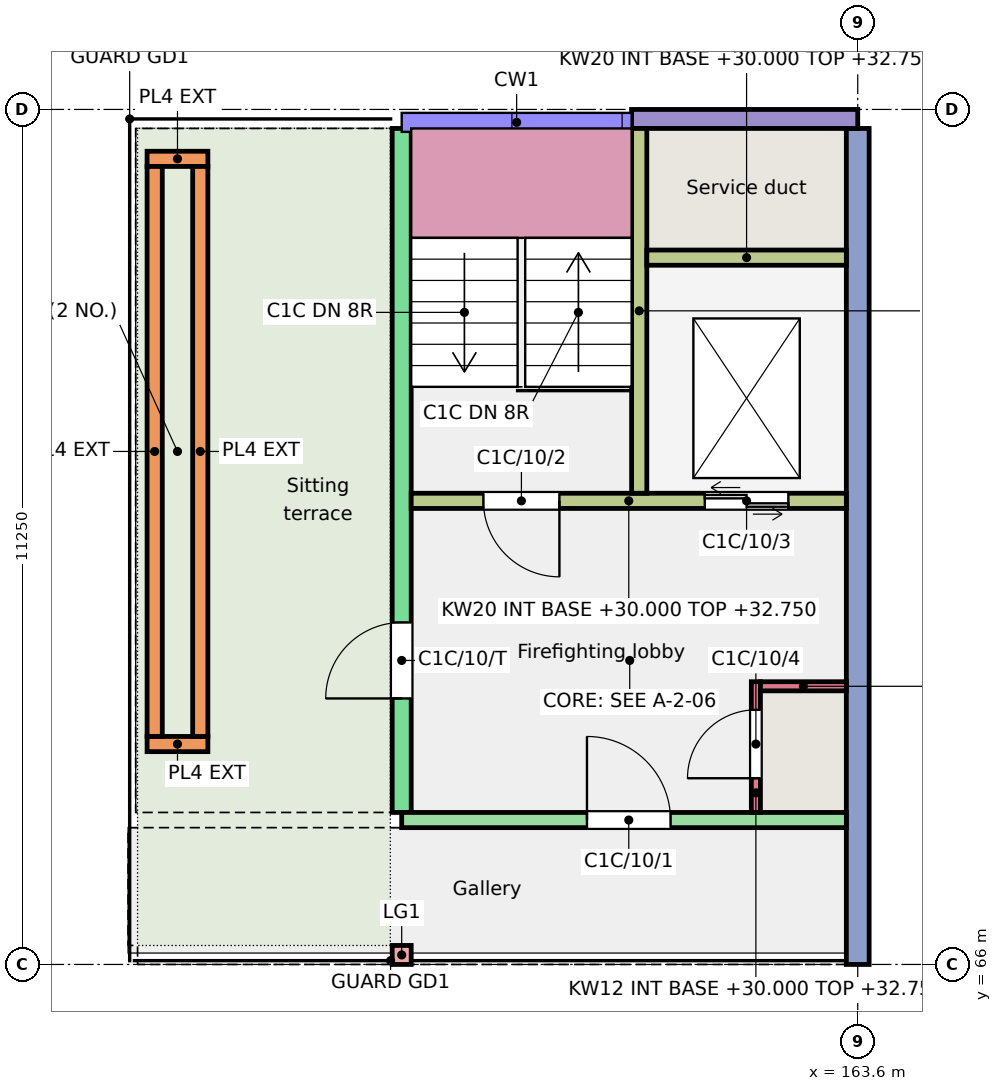
"""IFC4 building model, lengths in metres.
Left out: names, types, materials, properties, quantities, classifications, styles, units other than length and angle.
Written with IfcOpenShell. Run it as: python <this file> out.ifc"""

import sys

from ifc_helpers import new_model, si_unit, direction, frame, frame_2d, origin, origin_2d, place, context, subcontext, project, spatial, rectangle, extrude, element, fill, save


model = new_model("IFC4")
c1 = context("Model", 3, precision=1e-05, world=origin(), true_north=direction((0.0, 1.0)))
c2 = subcontext(c1, "Body", "Model", "MODEL_VIEW")
j1 = project(units=[si_unit("LENGTHUNIT", "METRE"), si_unit("PLANEANGLEUNIT", "RADIAN")], contexts=[c1])
p1 = place(None, origin())
s1 = spatial("IfcSite", under=j1, at=p1, CompositionType="ELEMENT")
p2 = place(p1, origin())
s2 = spatial("IfcBuilding", under=s1, at=p2, CompositionType="ELEMENT")
p3 = place(p2, frame((0.0, 0.0, 30.0)))
s3 = spatial("IfcBuildingStorey", under=s2, at=p3, CompositionType="ELEMENT", Elevation=30.0)
p4 = place(p3, frame((157.6, 68.0, 0.0), z_axis=(0.0, 0.0, 1.0), x_axis=(0.0, 1.0, 0.0)))
e1 = element("IfcWall", 1, at=p4, inside=s3, PredefinedType="SHEAR", context=c2, shape_type="SweptSolid", body=[
    extrude(rectangle(XDim=9.0, YDim=0.25, at=frame_2d((4.5, 0.0))), origin(), (0.0, 0.0, 1.0), 3.0),
])
p5 = place(p4, frame((1.5, 0.0, 0.0)))
e2 = element("IfcOpeningElement", 2, at=p5, cuts=e1, PredefinedType="OPENING", context=c2, shape_type="SweptSolid", body=[
    extrude(rectangle(XDim=1.0, YDim=2.1, at=frame_2d((0.5, 1.05))), frame((0.0, 0.135, 0.0), z_axis=(0.0, -1.0, 0.0), x_axis=(1.0, 0.0, 0.0)), (0.0, 0.0, 1.0), 0.27),
])
p6 = place(p3, frame((163.6, 66.0, 0.0), z_axis=(0.0, 0.0, 1.0), x_axis=(0.0, 1.0, 0.0)))
e3 = element("IfcWall", 3, at=p6, inside=s3, PredefinedType="SHEAR", context=c2, shape_type="SweptSolid", body=[
    extrude(rectangle(XDim=11.0, YDim=0.3, at=frame_2d((5.5, 0.0))), origin(), (0.0, 0.0, 1.0), 3.0),
])
p7 = place(p3, frame((160.625, 77.125, 0.0), z_axis=(0.0, 0.0, 1.0), x_axis=(1.0, 0.0, 0.0)))
e4 = element("IfcWall", 4, at=p7, inside=s3, PredefinedType="SOLIDWALL", context=c2, shape_type="SweptSolid", body=[
    extrude(rectangle(XDim=2.975, YDim=0.25, at=frame_2d((1.488, 0.0))), origin(), (0.0, 0.0, 1.0), 3.0),
])
p8 = place(p3, frame((157.6, 67.9, 0.0), z_axis=(0.0, 0.0, 1.0), x_axis=(1.0, 0.0, 0.0)))
e5 = element("IfcWall", 5, at=p8, inside=s3, PredefinedType="SHEAR", context=c2, shape_type="SweptSolid", body=[
    extrude(rectangle(XDim=5.85, YDim=0.2, at=frame_2d((2.925, 0.0))), origin(), (0.0, 0.0, 1.0), 2.75),
])
p9 = place(p8, frame((2.438, 0.0, 0.0)))
e6 = element("IfcOpeningElement", 6, at=p9, cuts=e5, PredefinedType="OPENING", context=c2, shape_type="SweptSolid", body=[
    extrude(rectangle(XDim=1.1, YDim=2.1, at=frame_2d((0.55, 1.05))), frame((0.0, 0.11, 0.0), z_axis=(0.0, -1.0, 0.0), x_axis=(1.0, 0.0, 0.0)), (0.0, 0.0, 1.0), 0.22),
])
p10 = place(p3, frame((157.725, 72.1, 0.0), z_axis=(0.0, 0.0, 1.0), x_axis=(1.0, 0.0, 0.0)))
e7 = element("IfcWall", 7, at=p10, inside=s3, PredefinedType="SHEAR", context=c2, shape_type="SweptSolid", body=[
    extrude(rectangle(XDim=5.725, YDim=0.2, at=frame_2d((2.862, 0.0))), origin(), (0.0, 0.0, 1.0), 2.75),
])
p11 = place(p10, frame((0.95, 0.0, 0.0)))
e8 = element("IfcOpeningElement", 8, at=p11, cuts=e7, PredefinedType="OPENING", context=c2, shape_type="SweptSolid", body=[
    extrude(rectangle(XDim=1.0, YDim=2.1, at=frame_2d((0.5, 1.05))), frame((0.0, 0.11, 0.0), z_axis=(0.0, -1.0, 0.0), x_axis=(1.0, 0.0, 0.0)), (0.0, 0.0, 1.0), 0.22),
])
p12 = place(p10, frame((3.863, 0.0, 0.0)))
e9 = element("IfcOpeningElement", 9, at=p12, cuts=e7, PredefinedType="OPENING", context=c2, shape_type="SweptSolid", body=[
    extrude(rectangle(XDim=1.1, YDim=2.1, at=frame_2d((0.55, 1.05))), frame((0.0, 0.11, 0.0), z_axis=(0.0, -1.0, 0.0), x_axis=(1.0, 0.0, 0.0)), (0.0, 0.0, 1.0), 0.22),
])
p13 = place(p3, frame((160.725, 72.2, 0.0), z_axis=(0.0, 0.0, 1.0), x_axis=(0.0, 1.0, 0.0)))
e10 = element("IfcWall", 10, at=p13, inside=s3, PredefinedType="SHEAR", context=c2, shape_type="SweptSolid", body=[
    extrude(rectangle(XDim=4.8, YDim=0.2, at=frame_2d((2.4, 0.0))), origin(), (0.0, 0.0, 1.0), 2.75),
])
p14 = place(p3, frame((160.825, 75.3, 0.0), z_axis=(0.0, 0.0, 1.0), x_axis=(1.0, 0.0, 0.0)))
e11 = element("IfcWall", 11, at=p14, inside=s3, PredefinedType="SHEAR", context=c2, shape_type="SweptSolid", body=[
    extrude(rectangle(XDim=2.625, YDim=0.2, at=frame_2d((1.312, 0.0))), origin(), (0.0, 0.0, 1.0), 2.75),
])
p15 = place(p3, frame((162.26, 68.0, 0.0), z_axis=(0.0, 0.0, 1.0), x_axis=(0.0, 1.0, 0.0)))
e12 = element("IfcWall", 12, at=p15, inside=s3, PredefinedType="SHEAR", context=c2, shape_type="SweptSolid", body=[
    extrude(rectangle(XDim=1.72, YDim=0.12, at=frame_2d((0.86, 0.0))), origin(), (0.0, 0.0, 1.0), 2.75),
])
p16 = place(p15, frame((0.45, 0.0, 0.0)))
e13 = element("IfcOpeningElement", 13, at=p16, cuts=e12, PredefinedType="OPENING", context=c2, shape_type="SweptSolid", body=[
    extrude(rectangle(XDim=0.9, YDim=2.1, at=frame_2d((0.45, 1.05))), frame((0.0, 0.07, 0.0), z_axis=(0.0, -1.0, 0.0), x_axis=(1.0, 0.0, 0.0)), (0.0, 0.0, 1.0), 0.14),
])
p17 = place(p3, frame((162.32, 69.66, 0.0), z_axis=(0.0, 0.0, 1.0), x_axis=(1.0, 0.0, 0.0)))
e14 = element("IfcWall", 14, at=p17, inside=s3, PredefinedType="SHEAR", context=c2, shape_type="SweptSolid", body=[
    extrude(rectangle(XDim=1.13, YDim=0.12, at=frame_2d((0.565, 0.0))), origin(), (0.0, 0.0, 1.0), 2.75),
])
p18 = place(p3, frame((157.6, 66.125, 0.0), z_axis=(0.0, 0.0, 1.0), x_axis=(1.0, 0.0, 0.0)))
e15 = element("IfcColumn", 15, at=p18, inside=s3, PredefinedType="COLUMN", context=c2, shape_type="SweptSolid", body=[
    extrude(rectangle(XDim=0.25, YDim=0.25, at=origin_2d()), origin(), (0.0, 0.0, 1.0), 3.0),
])
for number, where, z_axis, x_axis in (
    (16, (154.25, 68.9, 0.01), (0.0, 0.0, 1.0), (1.0, 0.0, 0.0)),
    (17, (154.25, 76.6, 0.01), (0.0, 0.0, 1.0), (1.0, 0.0, 0.0)),
):
    element("IfcWall", number, at=place(p3, frame(where, z_axis=z_axis, x_axis=x_axis)), inside=s3, PredefinedType="SOLIDWALL", context=c2, shape_type="SweptSolid", body=[
        extrude(rectangle(XDim=0.8, YDim=0.2, at=frame_2d((0.4, 0.0))), origin(), (0.0, 0.0, 1.0), 0.45),
    ])
for number, where, z_axis, x_axis in (
    (18, (154.35, 69.0, 0.01), (0.0, 0.0, 1.0), (0.0, 1.0, 0.0)),
    (19, (154.95, 69.0, 0.01), (0.0, 0.0, 1.0), (0.0, 1.0, 0.0)),
):
    element("IfcWall", number, at=place(p3, frame(where, z_axis=z_axis, x_axis=x_axis)), inside=s3, PredefinedType="SOLIDWALL", context=c2, shape_type="SweptSolid", body=[
        extrude(rectangle(XDim=7.5, YDim=0.2, at=frame_2d((3.75, 0.0))), origin(), (0.0, 0.0, 1.0), 0.45),
    ])
p19 = place(p9, origin())
e20 = element("IfcDoor", 20, at=p19, inside=s3, OperationType="SINGLE_SWING_LEFT", PredefinedType="DOOR", context=c2, shape_type="SweptSolid", body=[
    extrude(rectangle(XDim=1.1, YDim=2.1, at=frame_2d((0.55, 1.05))), frame((0.0, 0.025, 0.0), z_axis=(0.0, -1.0, 0.0), x_axis=(1.0, 0.0, 0.0)), (0.0, 0.0, 1.0), 0.05),
])
fill(e6, e20)
p20 = place(p11, origin())
e21 = element("IfcDoor", 21, at=p20, inside=s3, OperationType="SINGLE_SWING_RIGHT", PredefinedType="DOOR", context=c2, shape_type="SweptSolid", body=[
    extrude(rectangle(XDim=1.0, YDim=2.1, at=frame_2d((0.5, 1.05))), frame((0.0, 0.025, 0.0), z_axis=(0.0, -1.0, 0.0), x_axis=(1.0, 0.0, 0.0)), (0.0, 0.0, 1.0), 0.05),
])
fill(e8, e21)
p21 = place(p12, origin())
e22 = element("IfcDoor", 22, at=p21, inside=s3, OperationType="DOUBLE_DOOR_SLIDING", PredefinedType="DOOR", context=c2, shape_type="SweptSolid", body=[
    extrude(rectangle(XDim=1.1, YDim=2.1, at=frame_2d((0.55, 1.05))), frame((0.0, 0.025, 0.0), z_axis=(0.0, -1.0, 0.0), x_axis=(1.0, 0.0, 0.0)), (0.0, 0.0, 1.0), 0.05),
])
fill(e9, e22)
p22 = place(p16, origin())
e23 = element("IfcDoor", 23, at=p22, inside=s3, OperationType="SINGLE_SWING_LEFT", PredefinedType="DOOR", context=c2, shape_type="SweptSolid", body=[
    extrude(rectangle(XDim=0.9, YDim=2.1, at=frame_2d((0.45, 1.05))), frame((0.0, 0.025, 0.0), z_axis=(0.0, -1.0, 0.0), x_axis=(1.0, 0.0, 0.0)), (0.0, 0.0, 1.0), 0.05),
])
fill(e13, e23)
p23 = place(p5, origin())
e24 = element("IfcDoor", 24, at=p23, inside=s3, OperationType="SINGLE_SWING_LEFT", PredefinedType="DOOR", context=c2, shape_type="SweptSolid", body=[
    extrude(rectangle(XDim=1.0, YDim=2.1, at=frame_2d((0.5, 1.05))), frame((0.0, 0.025, 0.0), z_axis=(0.0, -1.0, 0.0), x_axis=(1.0, 0.0, 0.0)), (0.0, 0.0, 1.0), 0.05),
])
fill(e2, e24)
save(model, sys.argv[1])
